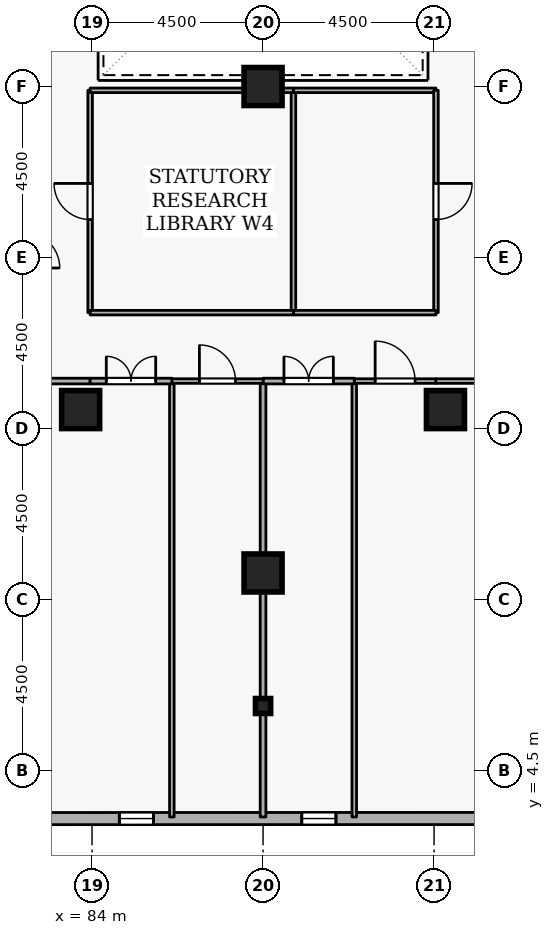
"""IFC4 building model, lengths in metres.
Left out: names, types, materials, properties, quantities, classifications, styles, units other than length and angle.
Written with IfcOpenShell. Run it as: python <this file> out.ifc"""

import sys

from ifc_helpers import new_model, si_unit, direction, frame, frame_2d, origin, origin_2d, place, context, subcontext, project, spatial, rectangle, i_section, extrude, element, fill, save


model = new_model("IFC4")
c1 = context("Model", 3, precision=1e-05, world=origin(), true_north=direction((0.0, 1.0)))
c2 = subcontext(c1, "Body", "Model", "MODEL_VIEW")
j1 = project(units=[si_unit("LENGTHUNIT", "METRE"), si_unit("PLANEANGLEUNIT", "RADIAN")], contexts=[c1])
p1 = place(None, origin())
s1 = spatial("IfcSite", under=j1, at=p1, CompositionType="ELEMENT")
p2 = place(p1, origin())
s2 = spatial("IfcBuilding", under=s1, at=p2, CompositionType="ELEMENT")
p3 = place(p2, frame((0.0, 0.0, 247.5)))
s3 = spatial("IfcBuildingStorey", under=s2, at=p3, CompositionType="ELEMENT", Elevation=247.5)
for number, where, z_axis, x_axis in (
    (1, (88.5, 9.7, 0.0), (0.0, 0.0, 1.0), (1.0, 0.0, 0.0)),
    (2, (93.3, 14.0, 0.0), (0.0, 0.0, 1.0), (1.0, 0.0, 0.0)),
    (3, (83.7, 14.0, 0.0), (0.0, 0.0, 1.0), (1.0, 0.0, 0.0)),
    (4, (88.5, 22.5, 0.0), (0.0, 0.0, 1.0), (1.0, 0.0, 0.0)),
):
    element("IfcColumn", number, at=place(p3, frame(where, z_axis=z_axis, x_axis=x_axis)), inside=s3, PredefinedType="COLUMN", context=c2, shape_type="SweptSolid", body=[
        extrude(rectangle(XDim=1.0, YDim=1.0, at=origin_2d()), origin(), (0.0, 0.0, 1.0), 3.6),
    ])
p4 = place(p3, frame((88.5, 6.2, 0.0), z_axis=(0.0, 0.0, 1.0), x_axis=(1.0, 0.0, 0.0)))
e5 = element("IfcColumn", 5, at=p4, inside=s3, PredefinedType="COLUMN", context=c2, shape_type="SweptSolid", body=[
    extrude(i_section(OverallWidth=0.399, OverallDepth=0.394, WebThickness=0.023, FlangeThickness=0.037, FilletRadius=0.015, at=origin_2d()), origin(), (0.0, 0.0, 1.0), 3.6),
])
p5 = place(p3, frame((73.319, 3.235, 0.0), z_axis=(0.0, 0.0, 1.0), x_axis=(0.99999997701, 0.000214431216, 0.0)))
e6 = element("IfcWall", 6, at=p5, inside=s3, PredefinedType="STANDARD", context=c2, shape_type="SweptSolid", body=[
    extrude(rectangle(XDim=34.156, YDim=0.32, at=frame_2d((17.078, 0.0))), origin(), (0.0, 0.0, 1.0), 2.7),
])
p6 = place(p5, frame((1.8, 0.0, 0.72)))
e7 = element("IfcOpeningElement", 7, at=p6, cuts=e6, PredefinedType="OPENING", context=c2, shape_type="SweptSolid", body=[
    extrude(rectangle(XDim=0.9, YDim=1.75, at=frame_2d((0.45, 0.875))), frame((0.0, 0.17, 0.0), z_axis=(0.0, -1.0, 0.0), x_axis=(1.0, 0.0, 0.0)), (0.0, 0.0, 1.0), 0.34),
])
p7 = place(p5, frame((6.6, 0.0, 0.72)))
e8 = element("IfcOpeningElement", 8, at=p7, cuts=e6, PredefinedType="OPENING", context=c2, shape_type="SweptSolid", body=[
    extrude(rectangle(XDim=0.9, YDim=1.75, at=frame_2d((0.45, 0.875))), frame((0.0, 0.17, 0.0), z_axis=(0.0, -1.0, 0.0), x_axis=(1.0, 0.0, 0.0)), (0.0, 0.0, 1.0), 0.34),
])
p8 = place(p5, frame((11.4, 0.0, 0.72)))
e9 = element("IfcOpeningElement", 9, at=p8, cuts=e6, PredefinedType="OPENING", context=c2, shape_type="SweptSolid", body=[
    extrude(rectangle(XDim=0.9, YDim=1.75, at=frame_2d((0.45, 0.875))), frame((0.0, 0.17, 0.0), z_axis=(0.0, -1.0, 0.0), x_axis=(1.0, 0.0, 0.0)), (0.0, 0.0, 1.0), 0.34),
])
p9 = place(p5, frame((16.2, 0.0, 0.72)))
e10 = element("IfcOpeningElement", 10, at=p9, cuts=e6, PredefinedType="OPENING", context=c2, shape_type="SweptSolid", body=[
    extrude(rectangle(XDim=0.9, YDim=1.75, at=frame_2d((0.45, 0.875))), frame((0.0, 0.17, 0.0), z_axis=(0.0, -1.0, 0.0), x_axis=(1.0, 0.0, 0.0)), (0.0, 0.0, 1.0), 0.34),
])
p10 = place(p5, frame((21.0, 0.0, 0.72)))
e11 = element("IfcOpeningElement", 11, at=p10, cuts=e6, PredefinedType="OPENING", context=c2, shape_type="SweptSolid", body=[
    extrude(rectangle(XDim=0.9, YDim=1.75, at=frame_2d((0.45, 0.875))), frame((0.0, 0.17, 0.0), z_axis=(0.0, -1.0, 0.0), x_axis=(1.0, 0.0, 0.0)), (0.0, 0.0, 1.0), 0.34),
])
p11 = place(p5, frame((25.8, 0.0, 0.72)))
e12 = element("IfcOpeningElement", 12, at=p11, cuts=e6, PredefinedType="OPENING", context=c2, shape_type="SweptSolid", body=[
    extrude(rectangle(XDim=0.9, YDim=1.75, at=frame_2d((0.45, 0.875))), frame((0.0, 0.17, 0.0), z_axis=(0.0, -1.0, 0.0), x_axis=(1.0, 0.0, 0.0)), (0.0, 0.0, 1.0), 0.34),
])
p12 = place(p5, frame((30.6, 0.0, 0.72)))
e13 = element("IfcOpeningElement", 13, at=p12, cuts=e6, PredefinedType="OPENING", context=c2, shape_type="SweptSolid", body=[
    extrude(rectangle(XDim=0.9, YDim=1.75, at=frame_2d((0.45, 0.875))), frame((0.0, 0.17, 0.0), z_axis=(0.0, -1.0, 0.0), x_axis=(1.0, 0.0, 0.0)), (0.0, 0.0, 1.0), 0.34),
])
p13 = place(p3, frame((90.9, 3.28, 0.0), z_axis=(0.0, 0.0, 1.0), x_axis=(0.0, 1.0, 0.0)))
e14 = element("IfcWall", 14, at=p13, inside=s3, PredefinedType="PARTITIONING", context=c2, shape_type="SweptSolid", body=[
    extrude(rectangle(XDim=11.47, YDim=0.12, at=frame_2d((5.735, 0.0))), origin(), (0.0, 0.0, 1.0), 3.34),
])
p14 = place(p3, frame((90.9, 14.75, 0.0), z_axis=(0.0, 0.0, 1.0), x_axis=(1.0, 0.0, 0.0)))
e15 = element("IfcWall", 15, at=p14, inside=s3, PredefinedType="PARTITIONING", context=c2, shape_type="SweptSolid", body=[
    extrude(rectangle(XDim=2.15, YDim=0.12, at=frame_2d((1.075, 0.0))), origin(), (0.0, 0.0, 1.0), 3.34),
])
p15 = place(p14, frame((0.55, 0.0, 0.0)))
e16 = element("IfcOpeningElement", 16, at=p15, cuts=e15, PredefinedType="OPENING", context=c2, shape_type="SweptSolid", body=[
    extrude(rectangle(XDim=1.05, YDim=2.1, at=frame_2d((0.525, 1.05))), frame((0.0, 0.07, 0.0), z_axis=(0.0, -1.0, 0.0), x_axis=(1.0, 0.0, 0.0)), (0.0, 0.0, 1.0), 0.14),
])
p16 = place(p3, frame((93.05, 14.75, 0.0), z_axis=(0.0, 0.0, 1.0), x_axis=(1.0, 0.0, 0.0)))
e17 = element("IfcWall", 17, at=p16, inside=s3, PredefinedType="PARTITIONING", context=c2, shape_type="SweptSolid", body=[
    extrude(rectangle(XDim=1.75, YDim=0.12, at=frame_2d((0.875, 0.0))), origin(), (0.0, 0.0, 1.0), 3.34),
])
p17 = place(p3, frame((88.5, 3.28, 0.0), z_axis=(0.0, 0.0, 1.0), x_axis=(0.0, 1.0, 0.0)))
e18 = element("IfcWall", 18, at=p17, inside=s3, PredefinedType="PARTITIONING", context=c2, shape_type="SweptSolid", body=[
    extrude(rectangle(XDim=11.47, YDim=0.15, at=frame_2d((5.735, 0.0))), origin(), (0.0, 0.0, 1.0), 2.882),
])
p18 = place(p3, frame((88.5, 14.75, 0.0), z_axis=(0.0, 0.0, 1.0), x_axis=(1.0, 0.0, 0.0)))
e19 = element("IfcWall", 19, at=p18, inside=s3, PredefinedType="PARTITIONING", context=c2, shape_type="SweptSolid", body=[
    extrude(rectangle(XDim=2.4, YDim=0.15, at=frame_2d((1.2, 0.0))), origin(), (0.0, 0.0, 1.0), 3.34),
])
p19 = place(p18, frame((0.55, 0.0, 0.0)))
e20 = element("IfcOpeningElement", 20, at=p19, cuts=e19, PredefinedType="OPENING", context=c2, shape_type="SweptSolid", body=[
    extrude(rectangle(XDim=1.3, YDim=2.12, at=frame_2d((0.65, 1.06))), frame((0.0, 0.085, 0.0), z_axis=(0.0, -1.0, 0.0), x_axis=(1.0, 0.0, 0.0)), (0.0, 0.0, 1.0), 0.17),
])
p20 = place(p3, frame((86.1, 3.28, 0.0), z_axis=(0.0, 0.0, 1.0), x_axis=(0.0, 1.0, 0.0)))
e21 = element("IfcWall", 21, at=p20, inside=s3, PredefinedType="PARTITIONING", context=c2, shape_type="SweptSolid", body=[
    extrude(rectangle(XDim=11.47, YDim=0.12, at=frame_2d((5.735, 0.0))), origin(), (0.0, 0.0, 1.0), 3.34),
])
p21 = place(p3, frame((86.1, 14.75, 0.0), z_axis=(0.0, 0.0, 1.0), x_axis=(1.0, 0.0, 0.0)))
e22 = element("IfcWall", 22, at=p21, inside=s3, PredefinedType="PARTITIONING", context=c2, shape_type="SweptSolid", body=[
    extrude(rectangle(XDim=2.4, YDim=0.12, at=frame_2d((1.2, 0.0))), origin(), (0.0, 0.0, 1.0), 3.34),
])
p22 = place(p21, frame((0.725, 0.0, 0.0)))
e23 = element("IfcOpeningElement", 23, at=p22, cuts=e22, PredefinedType="OPENING", context=c2, shape_type="SweptSolid", body=[
    extrude(rectangle(XDim=0.95, YDim=2.1, at=frame_2d((0.475, 1.05))), frame((0.0, 0.07, 0.0), z_axis=(0.0, -1.0, 0.0), x_axis=(1.0, 0.0, 0.0)), (0.0, 0.0, 1.0), 0.14),
])
p23 = place(p3, frame((82.2, 14.75, 0.0), z_axis=(0.0, 0.0, 1.0), x_axis=(1.0, 0.0, 0.0)))
e24 = element("IfcWall", 24, at=p23, inside=s3, PredefinedType="PARTITIONING", context=c2, shape_type="SweptSolid", body=[
    extrude(rectangle(XDim=1.75, YDim=0.15, at=frame_2d((0.875, 0.0))), origin(), (0.0, 0.0, 1.0), 3.34),
])
p24 = place(p3, frame((83.95, 14.75, 0.0), z_axis=(0.0, 0.0, 1.0), x_axis=(1.0, 0.0, 0.0)))
e25 = element("IfcWall", 25, at=p24, inside=s3, PredefinedType="PARTITIONING", context=c2, shape_type="SweptSolid", body=[
    extrude(rectangle(XDim=2.15, YDim=0.15, at=frame_2d((1.075, 0.0))), origin(), (0.0, 0.0, 1.0), 3.34),
])
p25 = place(p24, frame((0.425, 0.0, 0.0)))
e26 = element("IfcOpeningElement", 26, at=p25, cuts=e25, PredefinedType="OPENING", context=c2, shape_type="SweptSolid", body=[
    extrude(rectangle(XDim=1.3, YDim=2.12, at=frame_2d((0.65, 1.06))), frame((0.0, 0.085, 0.0), z_axis=(0.0, -1.0, 0.0), x_axis=(1.0, 0.0, 0.0)), (0.0, 0.0, 1.0), 0.17),
])
p26 = place(p3, frame((89.3, 16.55, 0.0), z_axis=(0.0, 0.0, 1.0), x_axis=(0.0, 1.0, 0.0)))
e27 = element("IfcWall", 27, at=p26, inside=s3, PredefinedType="PARTITIONING", context=c2, shape_type="SweptSolid", body=[
    extrude(rectangle(XDim=5.85, YDim=0.12, at=frame_2d((2.925, 0.0))), origin(), (0.0, 0.0, 1.0), 3.34),
])
p27 = place(p3, frame((89.3, 22.4, 0.0), z_axis=(0.0, 0.0, 1.0), x_axis=(1.0, 0.0, 0.0)))
e28 = element("IfcWall", 28, at=p27, inside=s3, PredefinedType="PARTITIONING", context=c2, shape_type="SweptSolid", body=[
    extrude(rectangle(XDim=3.75, YDim=0.12, at=frame_2d((1.875, 0.0))), origin(), (0.0, 0.0, 1.0), 3.34),
])
p28 = place(p3, frame((93.05, 22.4, 0.0), z_axis=(0.0, 0.0, 1.0), x_axis=(0.0, -1.0, 0.0)))
e29 = element("IfcWall", 29, at=p28, inside=s3, PredefinedType="PARTITIONING", context=c2, shape_type="SweptSolid", body=[
    extrude(rectangle(XDim=5.85, YDim=0.12, at=frame_2d((2.925, 0.0))), origin(), (0.0, 0.0, 1.0), 3.34),
])
p29 = place(p28, frame((2.45, 0.0, 0.0)))
e30 = element("IfcOpeningElement", 30, at=p29, cuts=e29, PredefinedType="OPENING", context=c2, shape_type="SweptSolid", body=[
    extrude(rectangle(XDim=0.95, YDim=2.1, at=frame_2d((0.475, 1.05))), frame((0.0, 0.07, 0.0), z_axis=(0.0, -1.0, 0.0), x_axis=(1.0, 0.0, 0.0)), (0.0, 0.0, 1.0), 0.14),
])
p30 = place(p3, frame((93.05, 16.55, 0.0), z_axis=(0.0, 0.0, 1.0), x_axis=(-1.0, 0.0, 0.0)))
e31 = element("IfcWall", 31, at=p30, inside=s3, PredefinedType="PARTITIONING", context=c2, shape_type="SweptSolid", body=[
    extrude(rectangle(XDim=3.75, YDim=0.12, at=frame_2d((1.875, 0.0))), origin(), (0.0, 0.0, 1.0), 3.34),
])
p31 = place(p3, frame((83.95, 16.55, 0.0), z_axis=(0.0, 0.0, 1.0), x_axis=(0.0, 1.0, 0.0)))
e32 = element("IfcWall", 32, at=p31, inside=s3, PredefinedType="PARTITIONING", context=c2, shape_type="SweptSolid", body=[
    extrude(rectangle(XDim=5.85, YDim=0.12, at=frame_2d((2.925, 0.0))), origin(), (0.0, 0.0, 1.0), 3.34),
])
p32 = place(p31, frame((2.45, 0.0, 0.0)))
e33 = element("IfcOpeningElement", 33, at=p32, cuts=e32, PredefinedType="OPENING", context=c2, shape_type="SweptSolid", body=[
    extrude(rectangle(XDim=0.95, YDim=2.1, at=frame_2d((0.475, 1.05))), frame((0.0, 0.07, 0.0), z_axis=(0.0, -1.0, 0.0), x_axis=(1.0, 0.0, 0.0)), (0.0, 0.0, 1.0), 0.14),
])
for number, where, z_axis, x_axis in (
    (34, (83.95, 22.4, 0.0), (0.0, 0.0, 1.0), (1.0, 0.0, 0.0)),
    (35, (89.3, 16.55, 0.0), (0.0, 0.0, 1.0), (-1.0, 0.0, 0.0)),
):
    element("IfcWall", number, at=place(p3, frame(where, z_axis=z_axis, x_axis=x_axis)), inside=s3, PredefinedType="PARTITIONING", context=c2, shape_type="SweptSolid", body=[
        extrude(rectangle(XDim=5.35, YDim=0.12, at=frame_2d((2.675, 0.0))), origin(), (0.0, 0.0, 1.0), 3.34),
    ])
p33 = place(p8, origin())
e36 = element("IfcWindow", 36, at=p33, inside=s3, PartitioningType="SINGLE_PANEL", PredefinedType="WINDOW", context=c2, shape_type="SweptSolid", body=[
    extrude(rectangle(XDim=0.9, YDim=1.75, at=frame_2d((0.45, 0.875))), frame((0.0, 0.03, 0.0), z_axis=(0.0, -1.0, 0.0), x_axis=(1.0, 0.0, 0.0)), (0.0, 0.0, 1.0), 0.06),
])
fill(e9, e36)
p34 = place(p9, origin())
e37 = element("IfcWindow", 37, at=p34, inside=s3, PartitioningType="SINGLE_PANEL", PredefinedType="WINDOW", context=c2, shape_type="SweptSolid", body=[
    extrude(rectangle(XDim=0.9, YDim=1.75, at=frame_2d((0.45, 0.875))), frame((0.0, 0.03, 0.0), z_axis=(0.0, -1.0, 0.0), x_axis=(1.0, 0.0, 0.0)), (0.0, 0.0, 1.0), 0.06),
])
fill(e10, e37)
p35 = place(p15, origin())
e38 = element("IfcDoor", 38, at=p35, inside=s3, OperationType="SINGLE_SWING_LEFT", PredefinedType="DOOR", context=c2, shape_type="SweptSolid", body=[
    extrude(rectangle(XDim=1.05, YDim=2.1, at=frame_2d((0.525, 1.05))), frame((0.0, 0.025, 0.0), z_axis=(0.0, -1.0, 0.0), x_axis=(1.0, 0.0, 0.0)), (0.0, 0.0, 1.0), 0.05),
])
fill(e16, e38)
p36 = place(p19, origin())
e39 = element("IfcDoor", 39, at=p36, inside=s3, OperationType="DOUBLE_DOOR_SINGLE_SWING", PredefinedType="DOOR", context=c2, shape_type="SweptSolid", body=[
    extrude(rectangle(XDim=1.3, YDim=2.12, at=frame_2d((0.65, 1.06))), frame((0.0, 0.025, 0.0), z_axis=(0.0, -1.0, 0.0), x_axis=(1.0, 0.0, 0.0)), (0.0, 0.0, 1.0), 0.05),
])
fill(e20, e39)
p37 = place(p22, origin())
e40 = element("IfcDoor", 40, at=p37, inside=s3, OperationType="SINGLE_SWING_LEFT", PredefinedType="DOOR", context=c2, shape_type="SweptSolid", body=[
    extrude(rectangle(XDim=0.95, YDim=2.1, at=frame_2d((0.475, 1.05))), frame((0.0, 0.025, 0.0), z_axis=(0.0, -1.0, 0.0), x_axis=(1.0, 0.0, 0.0)), (0.0, 0.0, 1.0), 0.05),
])
fill(e23, e40)
p38 = place(p25, origin())
e41 = element("IfcDoor", 41, at=p38, inside=s3, OperationType="DOUBLE_DOOR_SINGLE_SWING", PredefinedType="DOOR", context=c2, shape_type="SweptSolid", body=[
    extrude(rectangle(XDim=1.3, YDim=2.12, at=frame_2d((0.65, 1.06))), frame((0.0, 0.025, 0.0), z_axis=(0.0, -1.0, 0.0), x_axis=(1.0, 0.0, 0.0)), (0.0, 0.0, 1.0), 0.05),
])
fill(e26, e41)
p39 = place(p29, origin())
e42 = element("IfcDoor", 42, at=p39, inside=s3, OperationType="SINGLE_SWING_LEFT", PredefinedType="DOOR", context=c2, shape_type="SweptSolid", body=[
    extrude(rectangle(XDim=0.95, YDim=2.1, at=frame_2d((0.475, 1.05))), frame((0.0, 0.025, 0.0), z_axis=(0.0, -1.0, 0.0), x_axis=(1.0, 0.0, 0.0)), (0.0, 0.0, 1.0), 0.05),
])
fill(e30, e42)
p40 = place(p32, origin())
e43 = element("IfcDoor", 43, at=p40, inside=s3, OperationType="SINGLE_SWING_RIGHT", PredefinedType="DOOR", context=c2, shape_type="SweptSolid", body=[
    extrude(rectangle(XDim=0.95, YDim=2.1, at=frame_2d((0.475, 1.05))), frame((0.0, 0.025, 0.0), z_axis=(0.0, -1.0, 0.0), x_axis=(1.0, 0.0, 0.0)), (0.0, 0.0, 1.0), 0.05),
])
fill(e33, e43)
save(model, sys.argv[1])
